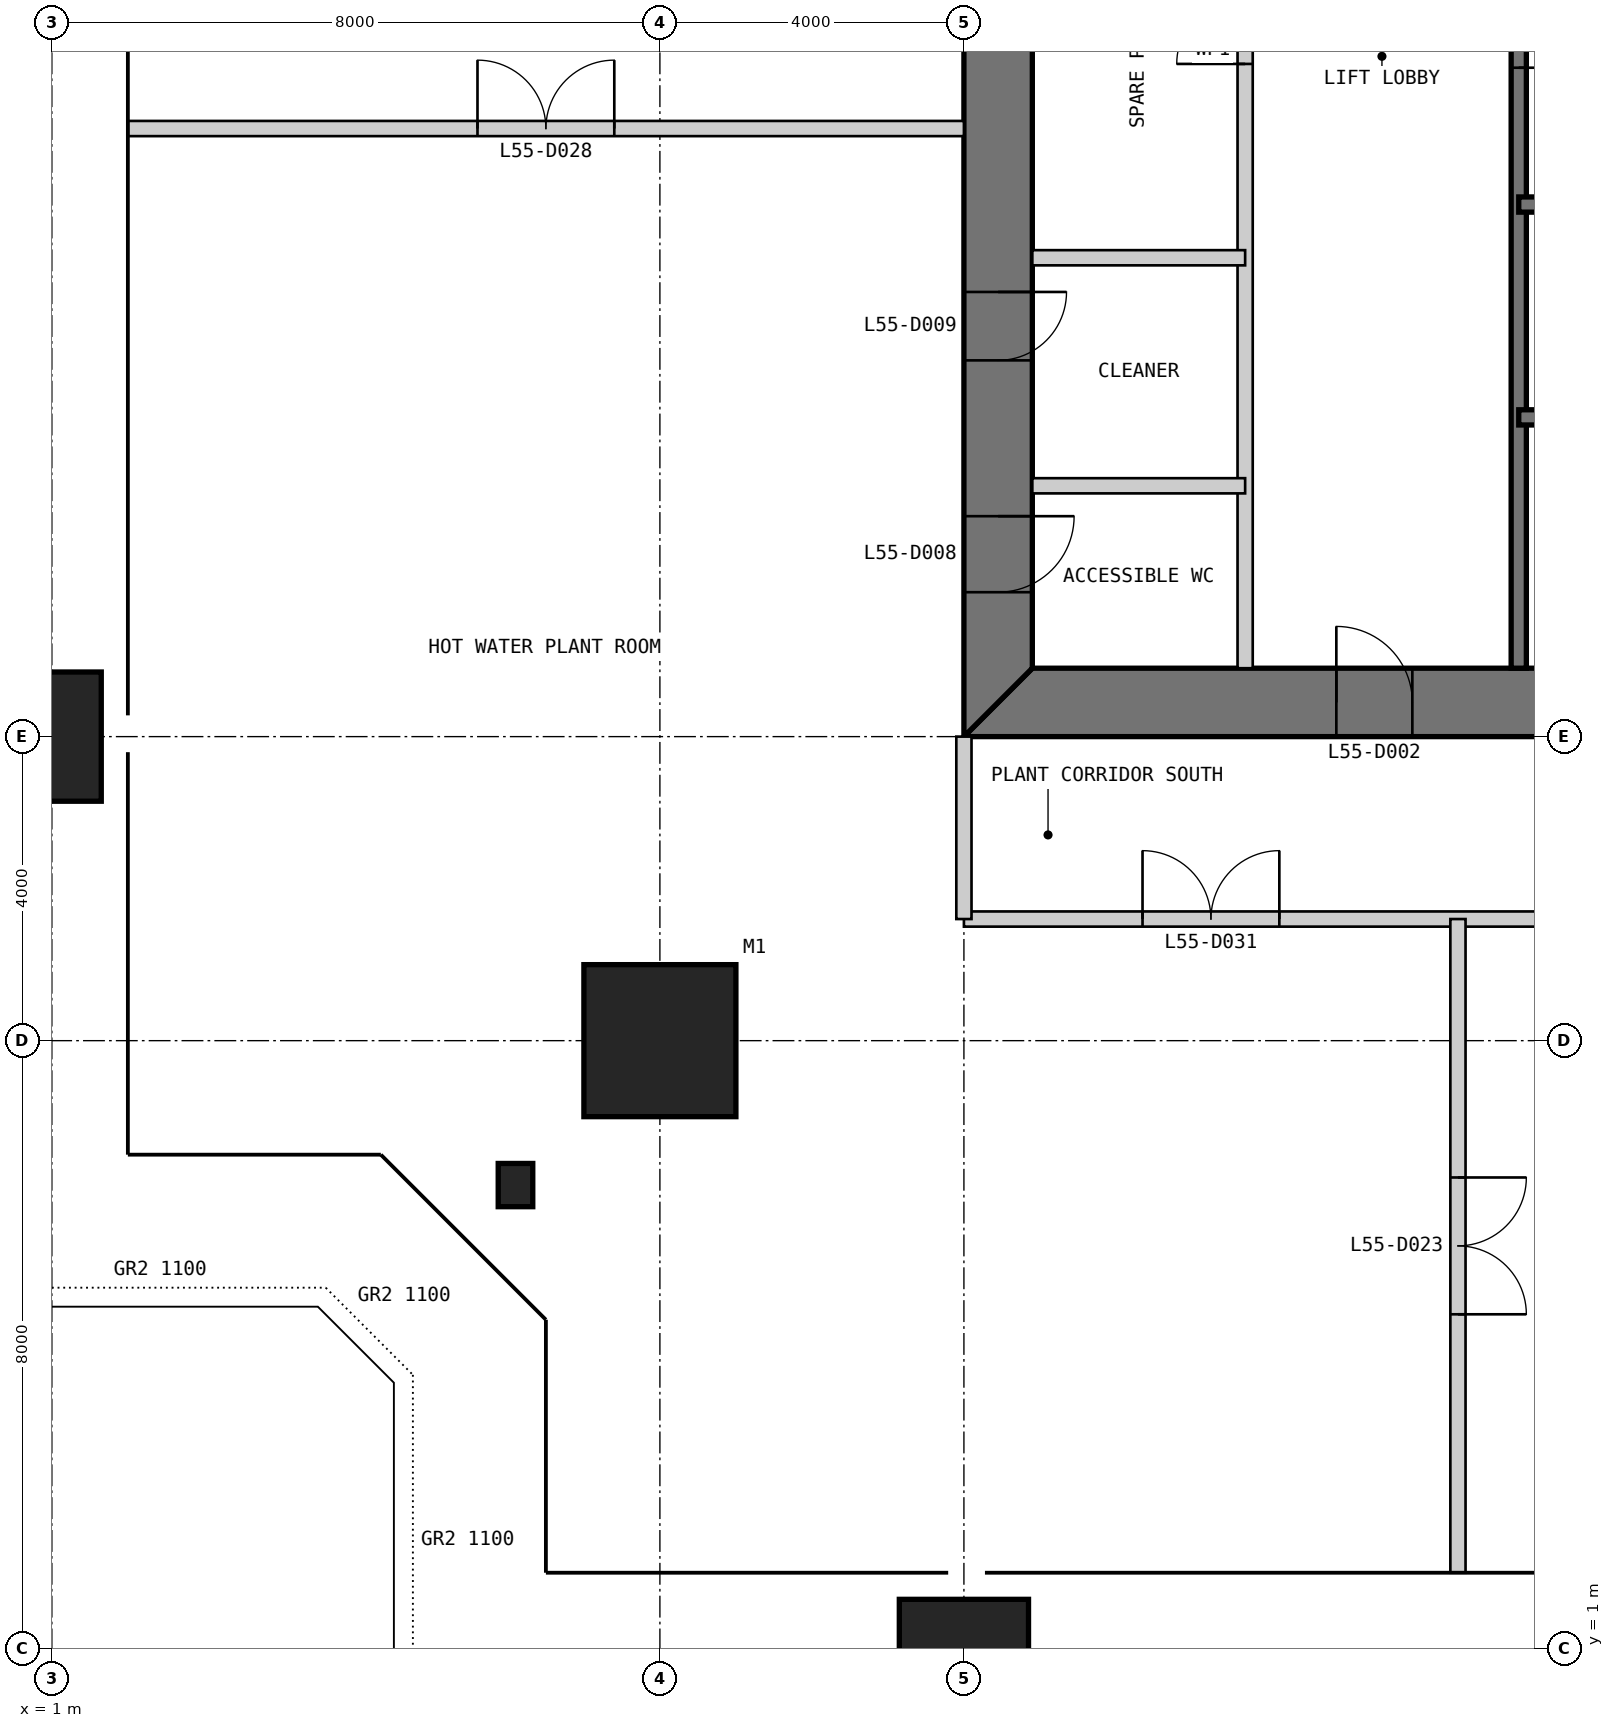
"""IFC4 building model, lengths in metres.
Left out: names, types, materials, properties, quantities, classifications, styles, units other than length and angle.
Written with IfcOpenShell. Run it as: python <this file> out.ifc"""

import sys

from ifc_helpers import new_model, si_unit, direction, frame, frame_2d, origin, origin_2d, place, context, subcontext, project, spatial, polyline, rectangle, i_section, outline, extrude, element, fill, save


model = new_model("IFC4")
c1 = context("Model", 3, precision=1e-05, world=origin(), true_north=direction((0.0, 1.0)))
c2 = subcontext(c1, "Body", "Model", "MODEL_VIEW")
j1 = project(units=[si_unit("LENGTHUNIT", "METRE"), si_unit("PLANEANGLEUNIT", "RADIAN")], contexts=[c1])
p1 = place(None, origin())
s1 = spatial("IfcSite", under=j1, at=p1, CompositionType="ELEMENT")
p2 = place(p1, origin())
s2 = spatial("IfcBuilding", under=s1, at=p2, CompositionType="ELEMENT")
p3 = place(p2, frame((0.0, 0.0, 233.8)))
s3 = spatial("IfcBuildingStorey", under=s2, at=p3, CompositionType="ELEMENT", Elevation=233.8)
p4 = place(p3, frame((9.0, 9.0, 0.0), z_axis=(0.0, 0.0, 1.0), x_axis=(1.0, 0.0, 0.0)))
e1 = element("IfcColumn", 1, at=p4, inside=s3, PredefinedType="COLUMN", context=c2, shape_type="SweptSolid", body=[
    extrude(rectangle(XDim=2.0, YDim=2.0, at=origin_2d()), origin(), (0.0, 0.0, 1.0), 6.0),
])
p5 = place(p3, frame((13.0, 1.0, 0.0), z_axis=(0.0, 0.0, 1.0), x_axis=(1.0, 0.0, 0.0)))
e2 = element("IfcColumn", 2, at=p5, inside=s3, PredefinedType="COLUMN", context=c2, shape_type="SweptSolid", body=[
    extrude(rectangle(XDim=1.7, YDim=1.3, at=origin_2d()), origin(), (0.0, 0.0, 1.0), 6.0),
])
p6 = place(p3, frame((1.0, 13.0, 0.0), z_axis=(0.0, 0.0, 1.0), x_axis=(1.0, 0.0, 0.0)))
e3 = element("IfcColumn", 3, at=p6, inside=s3, PredefinedType="COLUMN", context=c2, shape_type="SweptSolid", body=[
    extrude(rectangle(XDim=1.3, YDim=1.7, at=origin_2d()), origin(), (0.0, 0.0, 1.0), 6.0),
])
p7 = place(p3, frame((7.1, 7.1, 0.0), z_axis=(0.0, 0.0, 1.0), x_axis=(1.0, 0.0, 0.0)))
e4 = element("IfcColumn", 4, at=p7, inside=s3, PredefinedType="COLUMN", context=c2, shape_type="SweptSolid", body=[
    extrude(i_section(OverallWidth=0.455, OverallDepth=0.569, WebThickness=0.078, FlangeThickness=0.125, at=origin_2d()), origin(), (0.0, 0.0, 1.0), 4.6),
])
p8 = place(p3, frame((13.0, 13.45, 0.0), z_axis=(0.0, 0.0, 1.0), x_axis=(1.0, 0.0, 0.0)))
e5 = element("IfcWall", 5, at=p8, inside=s3, PredefinedType="SHEAR", context=c2, shape_type="SweptSolid", body=[
    extrude(outline(polyline([(0.0, -0.45), (24.0, -0.45), (23.1, 0.45), (0.9, 0.45), (0.0, -0.45)])), origin(), (0.0, 0.0, 1.0), 6.0),
])
p9 = place(p8, frame((4.9, 0.0, 0.0)))
e6 = element("IfcOpeningElement", 6, at=p9, cuts=e5, PredefinedType="OPENING", context=c2, shape_type="SweptSolid", body=[
    extrude(rectangle(XDim=1.0, YDim=2.2, at=frame_2d((0.5, 1.1))), frame((0.0, 0.46, 0.0), z_axis=(0.0, -1.0, 0.0), x_axis=(1.0, 0.0, 0.0)), (0.0, 0.0, 1.0), 0.92),
])
p10 = place(p8, frame((8.9, 0.0, 0.0)))
e7 = element("IfcOpeningElement", 7, at=p10, cuts=e5, PredefinedType="OPENING", context=c2, shape_type="SweptSolid", body=[
    extrude(rectangle(XDim=1.1, YDim=2.2, at=frame_2d((0.55, 1.1))), frame((0.0, 0.46, 0.0), z_axis=(0.0, -1.0, 0.0), x_axis=(1.0, 0.0, 0.0)), (0.0, 0.0, 1.0), 0.92),
])
p11 = place(p8, frame((15.05, 0.0, 0.0)))
e8 = element("IfcOpeningElement", 8, at=p11, cuts=e5, PredefinedType="OPENING", context=c2, shape_type="SweptSolid", body=[
    extrude(rectangle(XDim=0.9, YDim=2.2, at=frame_2d((0.45, 1.1))), frame((0.0, 0.46, 0.0), z_axis=(0.0, -1.0, 0.0), x_axis=(1.0, 0.0, 0.0)), (0.0, 0.0, 1.0), 0.92),
])
p12 = place(p8, frame((17.9, 0.0, 0.0)))
e9 = element("IfcOpeningElement", 9, at=p12, cuts=e5, PredefinedType="OPENING", context=c2, shape_type="SweptSolid", body=[
    extrude(rectangle(XDim=1.0, YDim=2.2, at=frame_2d((0.5, 1.1))), frame((0.0, 0.46, 0.0), z_axis=(0.0, -1.0, 0.0), x_axis=(1.0, 0.0, 0.0)), (0.0, 0.0, 1.0), 0.92),
])
p13 = place(p8, frame((21.4, 0.0, 0.0)))
e10 = element("IfcOpeningElement", 10, at=p13, cuts=e5, PredefinedType="OPENING", context=c2, shape_type="SweptSolid", body=[
    extrude(rectangle(XDim=1.0, YDim=2.2, at=frame_2d((0.5, 1.1))), frame((0.0, 0.46, 0.0), z_axis=(0.0, -1.0, 0.0), x_axis=(1.0, 0.0, 0.0)), (0.0, 0.0, 1.0), 0.92),
])
p14 = place(p3, frame((13.45, 36.1, 0.0), z_axis=(0.0, 0.0, 1.0), x_axis=(0.0, -1.0, 0.0)))
e11 = element("IfcWall", 11, at=p14, inside=s3, PredefinedType="SHEAR", context=c2, shape_type="SweptSolid", body=[
    extrude(outline(polyline([(-0.9, -0.45), (23.1, -0.45), (22.2, 0.45), (0.0, 0.45), (-0.9, -0.45)])), origin(), (0.0, 0.0, 1.0), 6.0),
])
p15 = place(p14, frame((20.2, 0.0, 0.0)))
e12 = element("IfcOpeningElement", 12, at=p15, cuts=e11, PredefinedType="OPENING", context=c2, shape_type="SweptSolid", body=[
    extrude(rectangle(XDim=1.0, YDim=2.2, at=frame_2d((0.5, 1.1))), frame((0.0, 0.46, 0.0), z_axis=(0.0, -1.0, 0.0), x_axis=(1.0, 0.0, 0.0)), (0.0, 0.0, 1.0), 0.92),
])
p16 = place(p14, frame((17.25, 0.0, 0.0)))
e13 = element("IfcOpeningElement", 13, at=p16, cuts=e11, PredefinedType="OPENING", context=c2, shape_type="SweptSolid", body=[
    extrude(rectangle(XDim=0.9, YDim=2.2, at=frame_2d((0.45, 1.1))), frame((0.0, 0.46, 0.0), z_axis=(0.0, -1.0, 0.0), x_axis=(1.0, 0.0, 0.0)), (0.0, 0.0, 1.0), 0.92),
])
p17 = place(p3, frame((16.7, 13.9, 0.0), z_axis=(0.0, 0.0, 1.0), x_axis=(0.0, 1.0, 0.0)))
e14 = element("IfcWall", 14, at=p17, inside=s3, PredefinedType="PARTITIONING", context=c2, shape_type="SweptSolid", body=[
    extrude(rectangle(XDim=16.1, YDim=0.2, at=frame_2d((8.05, 0.0))), origin(), (0.0, 0.0, 1.0), 5.8),
])
p18 = place(p17, frame((7.95, 0.0, 0.0)))
e15 = element("IfcOpeningElement", 15, at=p18, cuts=e14, PredefinedType="OPENING", context=c2, shape_type="SweptSolid", body=[
    extrude(rectangle(XDim=0.9, YDim=2.2, at=frame_2d((0.45, 1.1))), frame((0.0, 0.11, 0.0), z_axis=(0.0, -1.0, 0.0), x_axis=(1.0, 0.0, 0.0)), (0.0, 0.0, 1.0), 0.22),
])
p19 = place(p17, frame((13.3, 0.0, 0.0)))
e16 = element("IfcOpeningElement", 16, at=p19, cuts=e14, PredefinedType="OPENING", context=c2, shape_type="SweptSolid", body=[
    extrude(rectangle(XDim=0.9, YDim=2.2, at=frame_2d((0.45, 1.1))), frame((0.0, 0.11, 0.0), z_axis=(0.0, -1.0, 0.0), x_axis=(1.0, 0.0, 0.0)), (0.0, 0.0, 1.0), 0.22),
])
p20 = place(p3, frame((20.3, 13.9, 0.0), z_axis=(0.0, 0.0, 1.0), x_axis=(0.0, 1.0, 0.0)))
e17 = element("IfcWall", 17, at=p20, inside=s3, PredefinedType="SOLIDWALL", context=c2, shape_type="SweptSolid", body=[
    extrude(rectangle(XDim=16.1, YDim=0.2, at=frame_2d((8.05, 0.0))), origin(), (0.0, 0.0, 1.0), 5.8),
])
p21 = place(p20, frame((7.9, 0.0, 0.0)))
e18 = element("IfcOpeningElement", 18, at=p21, cuts=e17, PredefinedType="OPENING", context=c2, shape_type="SweptSolid", body=[
    extrude(rectangle(XDim=0.9, YDim=2.2, at=frame_2d((0.45, 1.1))), frame((0.0, 0.11, 0.0), z_axis=(0.0, -1.0, 0.0), x_axis=(1.0, 0.0, 0.0)), (0.0, 0.0, 1.0), 0.22),
])
p22 = place(p20, frame((12.9, 0.0, 0.0)))
e19 = element("IfcOpeningElement", 19, at=p22, cuts=e17, PredefinedType="OPENING", context=c2, shape_type="SweptSolid", body=[
    extrude(rectangle(XDim=0.9, YDim=2.2, at=frame_2d((0.45, 1.1))), frame((0.0, 0.11, 0.0), z_axis=(0.0, -1.0, 0.0), x_axis=(1.0, 0.0, 0.0)), (0.0, 0.0, 1.0), 0.22),
])
p23 = place(p3, frame((20.3, 17.2, 0.0), z_axis=(0.0, 0.0, 1.0), x_axis=(1.0, 0.0, 0.0)))
e20 = element("IfcWall", 20, at=p23, inside=s3, PredefinedType="SOLIDWALL", context=c2, shape_type="SweptSolid", body=[
    extrude(rectangle(XDim=9.4, YDim=0.2, at=frame_2d((4.7, 0.0))), origin(), (0.0, 0.0, 1.0), 5.8),
])
p24 = place(p23, frame((0.25, 0.0, 0.0)))
e21 = element("IfcOpeningElement", 21, at=p24, cuts=e20, PredefinedType="OPENING", context=c2, shape_type="SweptSolid", body=[
    extrude(rectangle(XDim=1.0, YDim=2.2, at=frame_2d((0.5, 1.1))), frame((0.0, 0.11, 0.0), z_axis=(0.0, -1.0, 0.0), x_axis=(1.0, 0.0, 0.0)), (0.0, 0.0, 1.0), 0.22),
])
p25 = place(p3, frame((20.3, 20.0, 0.0), z_axis=(0.0, 0.0, 1.0), x_axis=(1.0, 0.0, 0.0)))
e22 = element("IfcWall", 22, at=p25, inside=s3, PredefinedType="SOLIDWALL", context=c2, shape_type="SweptSolid", body=[
    extrude(rectangle(XDim=15.8, YDim=0.2, at=frame_2d((7.9, 0.0))), origin(), (0.0, 0.0, 1.0), 5.8),
])
for number, where, z_axis, x_axis in (
    (23, (13.9, 16.3, 0.0), (0.0, 0.0, 1.0), (1.0, 0.0, 0.0)),
    (24, (13.9, 19.3, 0.0), (0.0, 0.0, 1.0), (1.0, 0.0, 0.0)),
):
    element("IfcWall", number, at=place(p3, frame(where, z_axis=z_axis, x_axis=x_axis)), inside=s3, PredefinedType="PARTITIONING", context=c2, shape_type="SweptSolid", body=[
        extrude(rectangle(XDim=2.8, YDim=0.2, at=frame_2d((1.4, 0.0))), origin(), (0.0, 0.0, 1.0), 5.8),
    ])
p26 = place(p3, frame((13.0, 10.6, 0.0), z_axis=(0.0, 0.0, 1.0), x_axis=(1.0, 0.0, 0.0)))
e25 = element("IfcWall", 25, at=p26, inside=s3, PredefinedType="PARTITIONING", context=c2, shape_type="SweptSolid", body=[
    extrude(rectangle(XDim=24.0, YDim=0.2, at=frame_2d((12.0, 0.0))), origin(), (0.0, 0.0, 1.0), 5.8),
])
p27 = place(p26, frame((2.35, 0.0, 0.0)))
e26 = element("IfcOpeningElement", 26, at=p27, cuts=e25, PredefinedType="OPENING", context=c2, shape_type="SweptSolid", body=[
    extrude(rectangle(XDim=1.8, YDim=2.4, at=frame_2d((0.9, 1.2))), frame((0.0, 0.11, 0.0), z_axis=(0.0, -1.0, 0.0), x_axis=(1.0, 0.0, 0.0)), (0.0, 0.0, 1.0), 0.22),
])
p28 = place(p26, frame((9.35, 0.0, 0.0)))
e27 = element("IfcOpeningElement", 27, at=p28, cuts=e25, PredefinedType="OPENING", context=c2, shape_type="SweptSolid", body=[
    extrude(rectangle(XDim=1.8, YDim=2.4, at=frame_2d((0.9, 1.2))), frame((0.0, 0.11, 0.0), z_axis=(0.0, -1.0, 0.0), x_axis=(1.0, 0.0, 0.0)), (0.0, 0.0, 1.0), 0.22),
])
p29 = place(p26, frame((18.1, 0.0, 0.0)))
e28 = element("IfcOpeningElement", 28, at=p29, cuts=e25, PredefinedType="OPENING", context=c2, shape_type="SweptSolid", body=[
    extrude(rectangle(XDim=1.8, YDim=2.4, at=frame_2d((0.9, 1.2))), frame((0.0, 0.11, 0.0), z_axis=(0.0, -1.0, 0.0), x_axis=(1.0, 0.0, 0.0)), (0.0, 0.0, 1.0), 0.22),
])
p30 = place(p3, frame((13.0, 10.6, 0.0), z_axis=(0.0, 0.0, 1.0), x_axis=(0.0, 1.0, 0.0)))
e29 = element("IfcWall", 29, at=p30, inside=s3, PredefinedType="PARTITIONING", context=c2, shape_type="SweptSolid", body=[
    extrude(rectangle(XDim=2.4, YDim=0.2, at=frame_2d((1.2, 0.0))), origin(), (0.0, 0.0, 1.0), 4.705),
])
p31 = place(p3, frame((19.5, 2.0, 0.0), z_axis=(0.0, 0.0, 1.0), x_axis=(0.0, 1.0, 0.0)))
e30 = element("IfcWall", 30, at=p31, inside=s3, PredefinedType="PARTITIONING", context=c2, shape_type="SweptSolid", body=[
    extrude(rectangle(XDim=8.6, YDim=0.2, at=frame_2d((4.3, 0.0))), origin(), (0.0, 0.0, 1.0), 5.8),
])
p32 = place(p31, frame((3.4, 0.0, 0.0)))
e31 = element("IfcOpeningElement", 31, at=p32, cuts=e30, PredefinedType="OPENING", context=c2, shape_type="SweptSolid", body=[
    extrude(rectangle(XDim=1.8, YDim=2.4, at=frame_2d((0.9, 1.2))), frame((0.0, 0.11, 0.0), z_axis=(0.0, -1.0, 0.0), x_axis=(1.0, 0.0, 0.0)), (0.0, 0.0, 1.0), 0.22),
])
p33 = place(p3, frame((2.0, 21.0, 0.0), z_axis=(0.0, 0.0, 1.0), x_axis=(1.0, 0.0, 0.0)))
e32 = element("IfcWall", 32, at=p33, inside=s3, PredefinedType="PARTITIONING", context=c2, shape_type="SweptSolid", body=[
    extrude(rectangle(XDim=11.0, YDim=0.2, at=frame_2d((5.5, 0.0))), origin(), (0.0, 0.0, 1.0), 5.8),
])
p34 = place(p33, frame((4.6, 0.0, 0.0)))
e33 = element("IfcOpeningElement", 33, at=p34, cuts=e32, PredefinedType="OPENING", context=c2, shape_type="SweptSolid", body=[
    extrude(rectangle(XDim=1.8, YDim=2.4, at=frame_2d((0.9, 1.2))), frame((0.0, 0.11, 0.0), z_axis=(0.0, -1.0, 0.0), x_axis=(1.0, 0.0, 0.0)), (0.0, 0.0, 1.0), 0.22),
])
p35 = place(p9, origin())
e34 = element("IfcDoor", 34, at=p35, inside=s3, OperationType="SINGLE_SWING_LEFT", PredefinedType="DOOR", context=c2, shape_type="SweptSolid", body=[
    extrude(rectangle(XDim=1.0, YDim=2.2, at=frame_2d((0.5, 1.1))), frame((0.0, 0.025, 0.0), z_axis=(0.0, -1.0, 0.0), x_axis=(1.0, 0.0, 0.0)), (0.0, 0.0, 1.0), 0.05),
    extrude(outline(polyline([(0.0, 0.0), (0.04, 0.0), (0.04, 2.16), (0.96, 2.16), (0.96, 0.0), (1.0, 0.0), (1.0, 2.2), (0.0, 2.2), (0.0, 0.0)])), frame((0.0, 0.3, 0.0), z_axis=(0.0, -1.0, 0.0), x_axis=(1.0, 0.0, 0.0)), (0.0, 0.0, 1.0), 0.6),
])
fill(e6, e34)
p36 = place(p15, origin())
e35 = element("IfcDoor", 35, at=p36, inside=s3, OperationType="SINGLE_SWING_LEFT", PredefinedType="DOOR", context=c2, shape_type="SweptSolid", body=[
    extrude(rectangle(XDim=1.0, YDim=2.2, at=frame_2d((0.5, 1.1))), frame((0.0, 0.025, 0.0), z_axis=(0.0, -1.0, 0.0), x_axis=(1.0, 0.0, 0.0)), (0.0, 0.0, 1.0), 0.05),
    extrude(outline(polyline([(0.0, 0.0), (0.04, 0.0), (0.04, 2.16), (0.96, 2.16), (0.96, 0.0), (1.0, 0.0), (1.0, 2.2), (0.0, 2.2), (0.0, 0.0)])), frame((0.0, 0.3, 0.0), z_axis=(0.0, -1.0, 0.0), x_axis=(1.0, 0.0, 0.0)), (0.0, 0.0, 1.0), 0.6),
])
fill(e12, e35)
p37 = place(p16, origin())
e36 = element("IfcDoor", 36, at=p37, inside=s3, OperationType="SINGLE_SWING_LEFT", PredefinedType="DOOR", context=c2, shape_type="SweptSolid", body=[
    extrude(rectangle(XDim=0.9, YDim=2.2, at=frame_2d((0.45, 1.1))), frame((0.0, 0.025, 0.0), z_axis=(0.0, -1.0, 0.0), x_axis=(1.0, 0.0, 0.0)), (0.0, 0.0, 1.0), 0.05),
    extrude(outline(polyline([(0.0, 0.0), (0.04, 0.0), (0.04, 2.16), (0.86, 2.16), (0.86, 0.0), (0.9, 0.0), (0.9, 2.2), (0.0, 2.2), (0.0, 0.0)])), frame((0.0, 0.3, 0.0), z_axis=(0.0, -1.0, 0.0), x_axis=(1.0, 0.0, 0.0)), (0.0, 0.0, 1.0), 0.6),
])
fill(e13, e36)
p38 = place(p18, origin())
e37 = element("IfcDoor", 37, at=p38, inside=s3, OperationType="SINGLE_SWING_LEFT", PredefinedType="DOOR", context=c2, shape_type="SweptSolid", body=[
    extrude(rectangle(XDim=0.9, YDim=2.2, at=frame_2d((0.45, 1.1))), frame((0.0, 0.025, 0.0), z_axis=(0.0, -1.0, 0.0), x_axis=(1.0, 0.0, 0.0)), (0.0, 0.0, 1.0), 0.05),
])
fill(e15, e37)
p39 = place(p21, frame((0.9, 0.0, 0.0), z_axis=(0.0, 0.0, 1.0), x_axis=(-1.0, 0.0, 0.0)))
e38 = element("IfcDoor", 38, at=p39, inside=s3, OperationType="SINGLE_SWING_RIGHT", PredefinedType="DOOR", context=c2, shape_type="SweptSolid", body=[
    extrude(rectangle(XDim=0.9, YDim=2.2, at=frame_2d((0.45, 1.1))), frame((0.0, 0.025, 0.0), z_axis=(0.0, -1.0, 0.0), x_axis=(1.0, 0.0, 0.0)), (0.0, 0.0, 1.0), 0.05),
])
fill(e18, e38)
p40 = place(p32, frame((1.8, 0.0, 0.0), z_axis=(0.0, 0.0, 1.0), x_axis=(-1.0, 0.0, 0.0)))
e39 = element("IfcDoor", 39, at=p40, inside=s3, OperationType="DOUBLE_DOOR_SINGLE_SWING", PredefinedType="DOOR", context=c2, shape_type="SweptSolid", body=[
    extrude(rectangle(XDim=1.8, YDim=2.4, at=frame_2d((0.9, 1.2))), frame((0.0, 0.025, 0.0), z_axis=(0.0, -1.0, 0.0), x_axis=(1.0, 0.0, 0.0)), (0.0, 0.0, 1.0), 0.05),
])
fill(e31, e39)
p41 = place(p34, origin())
e40 = element("IfcDoor", 40, at=p41, inside=s3, OperationType="DOUBLE_DOOR_SINGLE_SWING", PredefinedType="DOOR", context=c2, shape_type="SweptSolid", body=[
    extrude(rectangle(XDim=1.8, YDim=2.4, at=frame_2d((0.9, 1.2))), frame((0.0, 0.025, 0.0), z_axis=(0.0, -1.0, 0.0), x_axis=(1.0, 0.0, 0.0)), (0.0, 0.0, 1.0), 0.05),
])
fill(e33, e40)
p42 = place(p27, origin())
e41 = element("IfcDoor", 41, at=p42, inside=s3, OperationType="DOUBLE_DOOR_SINGLE_SWING", PredefinedType="DOOR", context=c2, shape_type="SweptSolid", body=[
    extrude(rectangle(XDim=1.8, YDim=2.4, at=frame_2d((0.9, 1.2))), frame((0.0, 0.025, 0.0), z_axis=(0.0, -1.0, 0.0), x_axis=(1.0, 0.0, 0.0)), (0.0, 0.0, 1.0), 0.05),
])
fill(e26, e41)
save(model, sys.argv[1])
